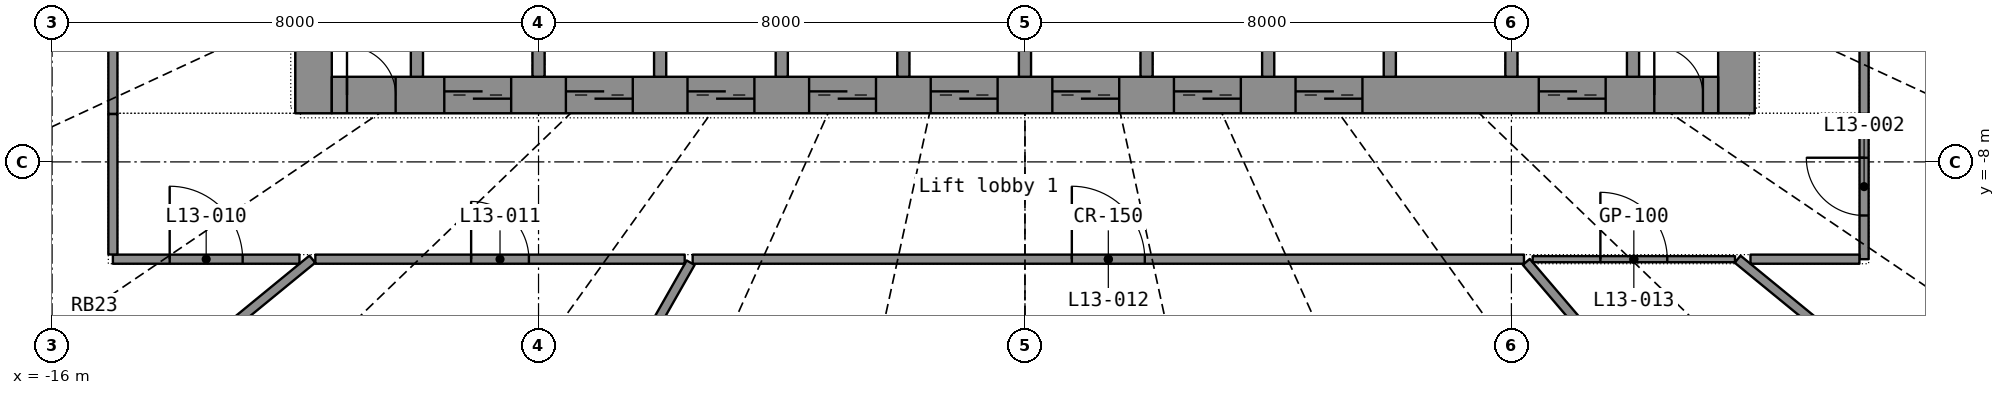
"""IFC4 building model, lengths in metres.
Left out: names, types, materials, properties, quantities, classifications, styles, units other than length and angle.
Written with IfcOpenShell. Run it as: python <this file> out.ifc"""

import sys

from ifc_helpers import new_model, si_unit, direction, frame, frame_2d, origin, place, context, subcontext, project, spatial, rectangle, extrude, element, fill, save


model = new_model("IFC4")
c1 = context("Model", 3, precision=1e-05, world=origin(), true_north=direction((0.0, 1.0)))
c2 = subcontext(c1, "Body", "Model", "MODEL_VIEW")
j1 = project(units=[si_unit("LENGTHUNIT", "METRE"), si_unit("PLANEANGLEUNIT", "RADIAN")], contexts=[c1])
p1 = place(None, origin())
s1 = spatial("IfcSite", under=j1, at=p1, CompositionType="ELEMENT")
p2 = place(p1, origin())
s2 = spatial("IfcBuilding", under=s1, at=p2, CompositionType="ELEMENT")
p3 = place(p2, frame((0.0, 0.0, 59.3)))
s3 = spatial("IfcBuildingStorey", under=s2, at=p3, CompositionType="ELEMENT", Elevation=59.3)
p4 = place(p3, frame((-11.7, -7.2, 0.0), z_axis=(0.0, 0.0, 1.0), x_axis=(0.0, 1.0, 0.0)))
e1 = element("IfcWall", 1, at=p4, inside=s3, PredefinedType="SHEAR", context=c2, shape_type="SweptSolid", body=[
    extrude(rectangle(XDim=14.4, YDim=0.6, at=frame_2d((7.2, 0.0))), origin(), (0.0, 0.0, 1.0), 3.3),
])
p5 = place(p4, frame((6.5, 0.0, 0.0)))
e2 = element("IfcOpeningElement", 2, at=p5, cuts=e1, PredefinedType="OPENING", context=c2, shape_type="SweptSolid", body=[
    extrude(rectangle(XDim=1.4, YDim=2.2, at=frame_2d((0.7, 1.1))), frame((0.0, 0.31, 0.0), z_axis=(0.0, -1.0, 0.0), x_axis=(1.0, 0.0, 0.0)), (0.0, 0.0, 1.0), 0.62),
])
p6 = place(p3, frame((11.7, -7.2, 0.0), z_axis=(0.0, 0.0, 1.0), x_axis=(0.0, 1.0, 0.0)))
e3 = element("IfcWall", 3, at=p6, inside=s3, PredefinedType="SHEAR", context=c2, shape_type="SweptSolid", body=[
    extrude(rectangle(XDim=14.4, YDim=0.6, at=frame_2d((7.2, 0.0))), origin(), (0.0, 0.0, 1.0), 3.3),
])
p7 = place(p6, frame((6.5, 0.0, 0.0)))
e4 = element("IfcOpeningElement", 4, at=p7, cuts=e3, PredefinedType="OPENING", context=c2, shape_type="SweptSolid", body=[
    extrude(rectangle(XDim=1.4, YDim=2.2, at=frame_2d((0.7, 1.1))), frame((0.0, 0.31, 0.0), z_axis=(0.0, -1.0, 0.0), x_axis=(1.0, 0.0, 0.0)), (0.0, 0.0, 1.0), 0.62),
])
p8 = place(p3, frame((-11.4, -6.9, 0.0), z_axis=(0.0, 0.0, 1.0), x_axis=(1.0, 0.0, 0.0)))
e5 = element("IfcWall", 5, at=p8, inside=s3, PredefinedType="SHEAR", context=c2, shape_type="SweptSolid", body=[
    extrude(rectangle(XDim=22.8, YDim=0.6, at=frame_2d((11.4, 0.0))), origin(), (0.0, 0.0, 1.0), 3.3),
])
p9 = place(p8, frame((1.85, 0.0, 0.0)))
e6 = element("IfcOpeningElement", 6, at=p9, cuts=e5, PredefinedType="OPENING", context=c2, shape_type="SweptSolid", body=[
    extrude(rectangle(XDim=1.1, YDim=2.2, at=frame_2d((0.55, 1.1))), frame((0.0, 0.31, 0.0), z_axis=(0.0, -1.0, 0.0), x_axis=(1.0, 0.0, 0.0)), (0.0, 0.0, 1.0), 0.62),
])
p10 = place(p8, frame((3.85, 0.0, 0.0)))
e7 = element("IfcOpeningElement", 7, at=p10, cuts=e5, PredefinedType="OPENING", context=c2, shape_type="SweptSolid", body=[
    extrude(rectangle(XDim=1.1, YDim=2.2, at=frame_2d((0.55, 1.1))), frame((0.0, 0.31, 0.0), z_axis=(0.0, -1.0, 0.0), x_axis=(1.0, 0.0, 0.0)), (0.0, 0.0, 1.0), 0.62),
])
p11 = place(p8, frame((5.85, 0.0, 0.0)))
e8 = element("IfcOpeningElement", 8, at=p11, cuts=e5, PredefinedType="OPENING", context=c2, shape_type="SweptSolid", body=[
    extrude(rectangle(XDim=1.1, YDim=2.2, at=frame_2d((0.55, 1.1))), frame((0.0, 0.31, 0.0), z_axis=(0.0, -1.0, 0.0), x_axis=(1.0, 0.0, 0.0)), (0.0, 0.0, 1.0), 0.62),
])
p12 = place(p8, frame((7.85, 0.0, 0.0)))
e9 = element("IfcOpeningElement", 9, at=p12, cuts=e5, PredefinedType="OPENING", context=c2, shape_type="SweptSolid", body=[
    extrude(rectangle(XDim=1.1, YDim=2.2, at=frame_2d((0.55, 1.1))), frame((0.0, 0.31, 0.0), z_axis=(0.0, -1.0, 0.0), x_axis=(1.0, 0.0, 0.0)), (0.0, 0.0, 1.0), 0.62),
])
p13 = place(p8, frame((9.85, 0.0, 0.0)))
e10 = element("IfcOpeningElement", 10, at=p13, cuts=e5, PredefinedType="OPENING", context=c2, shape_type="SweptSolid", body=[
    extrude(rectangle(XDim=1.1, YDim=2.2, at=frame_2d((0.55, 1.1))), frame((0.0, 0.31, 0.0), z_axis=(0.0, -1.0, 0.0), x_axis=(1.0, 0.0, 0.0)), (0.0, 0.0, 1.0), 0.62),
])
p14 = place(p8, frame((11.85, 0.0, 0.0)))
e11 = element("IfcOpeningElement", 11, at=p14, cuts=e5, PredefinedType="OPENING", context=c2, shape_type="SweptSolid", body=[
    extrude(rectangle(XDim=1.1, YDim=2.2, at=frame_2d((0.55, 1.1))), frame((0.0, 0.31, 0.0), z_axis=(0.0, -1.0, 0.0), x_axis=(1.0, 0.0, 0.0)), (0.0, 0.0, 1.0), 0.62),
])
p15 = place(p8, frame((13.85, 0.0, 0.0)))
e12 = element("IfcOpeningElement", 12, at=p15, cuts=e5, PredefinedType="OPENING", context=c2, shape_type="SweptSolid", body=[
    extrude(rectangle(XDim=1.1, YDim=2.2, at=frame_2d((0.55, 1.1))), frame((0.0, 0.31, 0.0), z_axis=(0.0, -1.0, 0.0), x_axis=(1.0, 0.0, 0.0)), (0.0, 0.0, 1.0), 0.62),
])
p16 = place(p8, frame((15.85, 0.0, 0.0)))
e13 = element("IfcOpeningElement", 13, at=p16, cuts=e5, PredefinedType="OPENING", context=c2, shape_type="SweptSolid", body=[
    extrude(rectangle(XDim=1.1, YDim=2.2, at=frame_2d((0.55, 1.1))), frame((0.0, 0.31, 0.0), z_axis=(0.0, -1.0, 0.0), x_axis=(1.0, 0.0, 0.0)), (0.0, 0.0, 1.0), 0.62),
])
p17 = place(p8, frame((19.85, 0.0, 0.0)))
e14 = element("IfcOpeningElement", 14, at=p17, cuts=e5, PredefinedType="OPENING", context=c2, shape_type="SweptSolid", body=[
    extrude(rectangle(XDim=1.1, YDim=2.2, at=frame_2d((0.55, 1.1))), frame((0.0, 0.31, 0.0), z_axis=(0.0, -1.0, 0.0), x_axis=(1.0, 0.0, 0.0)), (0.0, 0.0, 1.0), 0.62),
])
p18 = place(p8, frame((0.25, 0.0, 0.0)))
e15 = element("IfcOpeningElement", 15, at=p18, cuts=e5, PredefinedType="OPENING", context=c2, shape_type="SweptSolid", body=[
    extrude(rectangle(XDim=0.8, YDim=2.05, at=frame_2d((0.4, 1.025))), frame((0.0, 0.31, 0.0), z_axis=(0.0, -1.0, 0.0), x_axis=(1.0, 0.0, 0.0)), (0.0, 0.0, 1.0), 0.62),
])
p19 = place(p8, frame((21.75, 0.0, 0.0)))
e16 = element("IfcOpeningElement", 16, at=p19, cuts=e5, PredefinedType="OPENING", context=c2, shape_type="SweptSolid", body=[
    extrude(rectangle(XDim=0.8, YDim=2.05, at=frame_2d((0.4, 1.025))), frame((0.0, 0.31, 0.0), z_axis=(0.0, -1.0, 0.0), x_axis=(1.0, 0.0, 0.0)), (0.0, 0.0, 1.0), 0.62),
])
for number, where, z_axis, x_axis in (
    (17, (-10.0, -6.6, 0.0), (0.0, 0.0, 1.0), (0.0, 1.0, 0.0)),
    (18, (-8.0, -6.6, 0.0), (0.0, 0.0, 1.0), (0.0, 1.0, 0.0)),
    (19, (-6.0, -6.6, 0.0), (0.0, 0.0, 1.0), (0.0, 1.0, 0.0)),
    (20, (-4.0, -6.6, 0.0), (0.0, 0.0, 1.0), (0.0, 1.0, 0.0)),
    (21, (-2.0, -6.6, 0.0), (0.0, 0.0, 1.0), (0.0, 1.0, 0.0)),
    (22, (0.0, -6.6, 0.0), (0.0, 0.0, 1.0), (0.0, 1.0, 0.0)),
    (23, (2.0, -6.6, 0.0), (0.0, 0.0, 1.0), (0.0, 1.0, 0.0)),
    (24, (4.0, -6.6, 0.0), (0.0, 0.0, 1.0), (0.0, 1.0, 0.0)),
    (25, (6.0, -6.6, 0.0), (0.0, 0.0, 1.0), (0.0, 1.0, 0.0)),
    (26, (8.0, -6.6, 0.0), (0.0, 0.0, 1.0), (0.0, 1.0, 0.0)),
    (27, (10.0, -6.6, 0.0), (0.0, 0.0, 1.0), (0.0, 1.0, 0.0)),
):
    element("IfcWall", number, at=place(p3, frame(where, z_axis=z_axis, x_axis=x_axis)), inside=s3, PredefinedType="SHEAR", context=c2, shape_type="SweptSolid", body=[
        extrude(rectangle(XDim=2.7, YDim=0.2, at=frame_2d((1.35, 0.0))), origin(), (0.0, 0.0, 1.0), 3.3),
    ])
p20 = place(p3, frame((-5.465, -9.6, 0.0), z_axis=(0.0, 0.0, 1.0), x_axis=(1.0, 0.0, 0.0)))
e28 = element("IfcWall", 28, at=p20, inside=s3, PredefinedType="PARTITIONING", context=c2, shape_type="SweptSolid", body=[
    extrude(rectangle(XDim=13.672, YDim=0.15, at=frame_2d((6.836, 0.0))), origin(), (0.0, 0.0, 1.0), 2.4),
])
p21 = place(p20, frame((6.236, 0.0, 0.0)))
e29 = element("IfcOpeningElement", 29, at=p21, cuts=e28, PredefinedType="OPENING", context=c2, shape_type="SweptSolid", body=[
    extrude(rectangle(XDim=1.2, YDim=2.2, at=frame_2d((0.6, 1.1))), frame((0.0, 0.085, 0.0), z_axis=(0.0, -1.0, 0.0), x_axis=(1.0, 0.0, 0.0)), (0.0, 0.0, 1.0), 0.17),
])
p22 = place(p3, frame((-11.476, -20.159, 0.0), z_axis=(0.0, 0.0, 1.0), x_axis=(0.494734776, 0.869044016, 0.0)))
e30 = element("IfcWall", 30, at=p22, inside=s3, PredefinedType="PARTITIONING", context=c2, shape_type="SweptSolid", body=[
    extrude(rectangle(XDim=12.083, YDim=0.15, at=frame_2d((6.042, 0.0))), origin(), (0.0, 0.0, 1.0), 2.4),
])
p23 = place(p3, frame((15.577, -18.223, 0.0), z_axis=(0.0, 0.0, 1.0), x_axis=(-0.649782359, 0.76012031, 0.0)))
e31 = element("IfcWall", 31, at=p23, inside=s3, PredefinedType="PARTITIONING", context=c2, shape_type="SweptSolid", body=[
    extrude(rectangle(XDim=11.285, YDim=0.15, at=frame_2d((5.642, 0.0))), origin(), (0.0, 0.0, 1.0), 2.4),
])
p24 = place(p3, frame((-15.0, 3.217, 0.0), z_axis=(0.0, 0.0, 1.0), x_axis=(0.0, -1.0, 0.0)))
e32 = element("IfcWall", 32, at=p24, inside=s3, PredefinedType="PARTITIONING", context=c2, shape_type="SweptSolid", body=[
    extrude(rectangle(XDim=10.429, YDim=0.15, at=frame_2d((5.214, 0.0))), origin(), (0.0, 0.0, 1.0), 2.4),
])
p25 = place(p24, frame((4.615, 0.0, 0.0)))
e33 = element("IfcOpeningElement", 33, at=p25, cuts=e32, PredefinedType="OPENING", context=c2, shape_type="SweptSolid", body=[
    extrude(rectangle(XDim=1.2, YDim=2.2, at=frame_2d((0.6, 1.1))), frame((0.0, 0.085, 0.0), z_axis=(0.0, -1.0, 0.0), x_axis=(1.0, 0.0, 0.0)), (0.0, 0.0, 1.0), 0.17),
])
for number, where, z_axis, x_axis in (
    (34, (-19.207, -15.733, 0.0), (0.0, 0.0, 1.0), (0.774, 0.634, 0.0)),
    (35, (11.72, -9.6, 0.0), (0.0, 0.0, 1.0), (0.774, -0.634, 0.0)),
):
    element("IfcWall", number, at=place(p3, frame(where, z_axis=z_axis, x_axis=x_axis)), inside=s3, PredefinedType="PARTITIONING", context=c2, shape_type="SweptSolid", body=[
        extrude(rectangle(XDim=9.678, YDim=0.15, at=frame_2d((4.839, 0.0))), origin(), (0.0, 0.0, 1.0), 2.4),
    ])
p26 = place(p3, frame((-11.671, -9.6, 0.0), z_axis=(0.0, 0.0, 1.0), x_axis=(1.0, 0.0, 0.0)))
e36 = element("IfcWall", 36, at=p26, inside=s3, PredefinedType="PARTITIONING", context=c2, shape_type="SweptSolid", body=[
    extrude(rectangle(XDim=6.074, YDim=0.15, at=frame_2d((3.037, 0.0))), origin(), (0.0, 0.0, 1.0), 2.4),
])
p27 = place(p26, frame((2.562, 0.0, 0.0)))
e37 = element("IfcOpeningElement", 37, at=p27, cuts=e36, PredefinedType="OPENING", context=c2, shape_type="SweptSolid", body=[
    extrude(rectangle(XDim=0.95, YDim=2.15, at=frame_2d((0.475, 1.075))), frame((0.0, 0.085, 0.0), z_axis=(0.0, -1.0, 0.0), x_axis=(1.0, 0.0, 0.0)), (0.0, 0.0, 1.0), 0.17),
])
p28 = place(p3, frame((13.8, -7.212, 0.0), z_axis=(0.0, 0.0, 1.0), x_axis=(0.0, 1.0, 0.0)))
e38 = element("IfcWall", 38, at=p28, inside=s3, PredefinedType="PARTITIONING", context=c2, shape_type="SweptSolid", body=[
    extrude(rectangle(XDim=4.088, YDim=0.15, at=frame_2d((2.044, 0.0))), origin(), (0.0, 0.0, 1.0), 2.4),
])
p29 = place(p28, frame((1.569, 0.0, 0.0)))
e39 = element("IfcOpeningElement", 39, at=p29, cuts=e38, PredefinedType="OPENING", context=c2, shape_type="SweptSolid", body=[
    extrude(rectangle(XDim=0.95, YDim=2.15, at=frame_2d((0.475, 1.075))), frame((0.0, 0.085, 0.0), z_axis=(0.0, -1.0, 0.0), x_axis=(1.0, 0.0, 0.0)), (0.0, 0.0, 1.0), 0.17),
])
p30 = place(p3, frame((8.35, -9.6, 0.0), z_axis=(0.0, 0.0, 1.0), x_axis=(1.0, 0.0, 0.0)))
e40 = element("IfcWall", 40, at=p30, inside=s3, PredefinedType="PARTITIONING", context=c2, shape_type="SweptSolid", body=[
    extrude(rectangle(XDim=3.327, YDim=0.1, at=frame_2d((1.664, 0.0))), origin(), (0.0, 0.0, 1.0), 2.4),
])
p31 = place(p30, frame((1.114, 0.0, 0.0)))
e41 = element("IfcOpeningElement", 41, at=p31, cuts=e40, PredefinedType="OPENING", context=c2, shape_type="SweptSolid", body=[
    extrude(rectangle(XDim=1.1, YDim=2.2, at=frame_2d((0.55, 1.1))), frame((0.0, 0.06, 0.0), z_axis=(0.0, -1.0, 0.0), x_axis=(1.0, 0.0, 0.0)), (0.0, 0.0, 1.0), 0.12),
])
p32 = place(p3, frame((-15.0, -9.6, 0.0), z_axis=(0.0, 0.0, 1.0), x_axis=(1.0, 0.0, 0.0)))
e42 = element("IfcWall", 42, at=p32, inside=s3, PredefinedType="PARTITIONING", context=c2, shape_type="SweptSolid", body=[
    extrude(rectangle(XDim=3.068, YDim=0.15, at=frame_2d((1.534, 0.0))), origin(), (0.0, 0.0, 1.0), 2.4),
])
p33 = place(p32, frame((0.934, 0.0, 0.0)))
e43 = element("IfcOpeningElement", 43, at=p33, cuts=e42, PredefinedType="OPENING", context=c2, shape_type="SweptSolid", body=[
    extrude(rectangle(XDim=1.2, YDim=2.2, at=frame_2d((0.6, 1.1))), frame((0.0, 0.085, 0.0), z_axis=(0.0, -1.0, 0.0), x_axis=(1.0, 0.0, 0.0)), (0.0, 0.0, 1.0), 0.17),
])
p34 = place(p3, frame((-15.0, -7.213, 0.0), z_axis=(0.0, 0.0, 1.0), x_axis=(0.0, -1.0, 0.0)))
e44 = element("IfcWall", 44, at=p34, inside=s3, PredefinedType="PARTITIONING", context=c2, shape_type="SweptSolid", body=[
    extrude(rectangle(XDim=2.31, YDim=0.15, at=frame_2d((1.155, 0.0))), origin(), (0.0, 0.0, 1.0), 2.4),
])
p35 = place(p3, frame((13.8, -9.6, 0.0), z_axis=(0.0, 0.0, 1.0), x_axis=(0.0, 1.0, 0.0)))
e45 = element("IfcWall", 45, at=p35, inside=s3, PredefinedType="PARTITIONING", context=c2, shape_type="SweptSolid", body=[
    extrude(rectangle(XDim=2.387, YDim=0.15, at=frame_2d((1.194, 0.0))), origin(), (0.0, 0.0, 1.0), 2.4),
])
p36 = place(p35, frame((0.719, 0.0, 0.0)))
e46 = element("IfcOpeningElement", 46, at=p36, cuts=e45, PredefinedType="OPENING", context=c2, shape_type="SweptSolid", body=[
    extrude(rectangle(XDim=0.95, YDim=2.15, at=frame_2d((0.475, 1.075))), frame((0.0, 0.085, 0.0), z_axis=(0.0, -1.0, 0.0), x_axis=(1.0, 0.0, 0.0)), (0.0, 0.0, 1.0), 0.17),
])
p37 = place(p3, frame((11.932, -9.6, 0.0), z_axis=(0.0, 0.0, 1.0), x_axis=(1.0, 0.0, 0.0)))
e47 = element("IfcWall", 47, at=p37, inside=s3, PredefinedType="PARTITIONING", context=c2, shape_type="SweptSolid", body=[
    extrude(rectangle(XDim=1.791, YDim=0.15, at=frame_2d((0.896, 0.0))), origin(), (0.0, 0.0, 1.0), 2.4),
])
p38 = place(p9, origin())
e48 = element("IfcDoor", 48, at=p38, inside=s3, OperationType="DOUBLE_DOOR_SLIDING", PredefinedType="DOOR", context=c2, shape_type="SweptSolid", body=[
    extrude(rectangle(XDim=1.1, YDim=2.2, at=frame_2d((0.55, 1.1))), frame((0.0, 0.025, 0.0), z_axis=(0.0, -1.0, 0.0), x_axis=(1.0, 0.0, 0.0)), (0.0, 0.0, 1.0), 0.05),
])
fill(e6, e48)
p39 = place(p10, origin())
e49 = element("IfcDoor", 49, at=p39, inside=s3, OperationType="DOUBLE_DOOR_SLIDING", PredefinedType="DOOR", context=c2, shape_type="SweptSolid", body=[
    extrude(rectangle(XDim=1.1, YDim=2.2, at=frame_2d((0.55, 1.1))), frame((0.0, 0.025, 0.0), z_axis=(0.0, -1.0, 0.0), x_axis=(1.0, 0.0, 0.0)), (0.0, 0.0, 1.0), 0.05),
])
fill(e7, e49)
p40 = place(p11, origin())
e50 = element("IfcDoor", 50, at=p40, inside=s3, OperationType="DOUBLE_DOOR_SLIDING", PredefinedType="DOOR", context=c2, shape_type="SweptSolid", body=[
    extrude(rectangle(XDim=1.1, YDim=2.2, at=frame_2d((0.55, 1.1))), frame((0.0, 0.025, 0.0), z_axis=(0.0, -1.0, 0.0), x_axis=(1.0, 0.0, 0.0)), (0.0, 0.0, 1.0), 0.05),
])
fill(e8, e50)
p41 = place(p12, origin())
e51 = element("IfcDoor", 51, at=p41, inside=s3, OperationType="DOUBLE_DOOR_SLIDING", PredefinedType="DOOR", context=c2, shape_type="SweptSolid", body=[
    extrude(rectangle(XDim=1.1, YDim=2.2, at=frame_2d((0.55, 1.1))), frame((0.0, 0.025, 0.0), z_axis=(0.0, -1.0, 0.0), x_axis=(1.0, 0.0, 0.0)), (0.0, 0.0, 1.0), 0.05),
])
fill(e9, e51)
p42 = place(p13, origin())
e52 = element("IfcDoor", 52, at=p42, inside=s3, OperationType="DOUBLE_DOOR_SLIDING", PredefinedType="DOOR", context=c2, shape_type="SweptSolid", body=[
    extrude(rectangle(XDim=1.1, YDim=2.2, at=frame_2d((0.55, 1.1))), frame((0.0, 0.025, 0.0), z_axis=(0.0, -1.0, 0.0), x_axis=(1.0, 0.0, 0.0)), (0.0, 0.0, 1.0), 0.05),
])
fill(e10, e52)
p43 = place(p14, origin())
e53 = element("IfcDoor", 53, at=p43, inside=s3, OperationType="DOUBLE_DOOR_SLIDING", PredefinedType="DOOR", context=c2, shape_type="SweptSolid", body=[
    extrude(rectangle(XDim=1.1, YDim=2.2, at=frame_2d((0.55, 1.1))), frame((0.0, 0.025, 0.0), z_axis=(0.0, -1.0, 0.0), x_axis=(1.0, 0.0, 0.0)), (0.0, 0.0, 1.0), 0.05),
])
fill(e11, e53)
p44 = place(p15, origin())
e54 = element("IfcDoor", 54, at=p44, inside=s3, OperationType="DOUBLE_DOOR_SLIDING", PredefinedType="DOOR", context=c2, shape_type="SweptSolid", body=[
    extrude(rectangle(XDim=1.1, YDim=2.2, at=frame_2d((0.55, 1.1))), frame((0.0, 0.025, 0.0), z_axis=(0.0, -1.0, 0.0), x_axis=(1.0, 0.0, 0.0)), (0.0, 0.0, 1.0), 0.05),
])
fill(e12, e54)
p45 = place(p16, origin())
e55 = element("IfcDoor", 55, at=p45, inside=s3, OperationType="DOUBLE_DOOR_SLIDING", PredefinedType="DOOR", context=c2, shape_type="SweptSolid", body=[
    extrude(rectangle(XDim=1.1, YDim=2.2, at=frame_2d((0.55, 1.1))), frame((0.0, 0.025, 0.0), z_axis=(0.0, -1.0, 0.0), x_axis=(1.0, 0.0, 0.0)), (0.0, 0.0, 1.0), 0.05),
])
fill(e13, e55)
p46 = place(p17, origin())
e56 = element("IfcDoor", 56, at=p46, inside=s3, OperationType="DOUBLE_DOOR_SLIDING", PredefinedType="DOOR", context=c2, shape_type="SweptSolid", body=[
    extrude(rectangle(XDim=1.1, YDim=2.2, at=frame_2d((0.55, 1.1))), frame((0.0, 0.025, 0.0), z_axis=(0.0, -1.0, 0.0), x_axis=(1.0, 0.0, 0.0)), (0.0, 0.0, 1.0), 0.05),
])
fill(e14, e56)
p47 = place(p18, origin())
e57 = element("IfcDoor", 57, at=p47, inside=s3, OperationType="SINGLE_SWING_LEFT", PredefinedType="DOOR", context=c2, shape_type="SweptSolid", body=[
    extrude(rectangle(XDim=0.8, YDim=2.05, at=frame_2d((0.4, 1.025))), frame((0.0, 0.025, 0.0), z_axis=(0.0, -1.0, 0.0), x_axis=(1.0, 0.0, 0.0)), (0.0, 0.0, 1.0), 0.05),
])
fill(e15, e57)
p48 = place(p19, origin())
e58 = element("IfcDoor", 58, at=p48, inside=s3, OperationType="SINGLE_SWING_LEFT", PredefinedType="DOOR", context=c2, shape_type="SweptSolid", body=[
    extrude(rectangle(XDim=0.8, YDim=2.05, at=frame_2d((0.4, 1.025))), frame((0.0, 0.025, 0.0), z_axis=(0.0, -1.0, 0.0), x_axis=(1.0, 0.0, 0.0)), (0.0, 0.0, 1.0), 0.05),
])
fill(e16, e58)
p49 = place(p36, origin())
e59 = element("IfcDoor", 59, at=p49, inside=s3, OperationType="SINGLE_SWING_RIGHT", PredefinedType="DOOR", context=c2, shape_type="SweptSolid", body=[
    extrude(rectangle(XDim=0.95, YDim=2.15, at=frame_2d((0.475, 1.075))), frame((0.0, 0.025, 0.0), z_axis=(0.0, -1.0, 0.0), x_axis=(1.0, 0.0, 0.0)), (0.0, 0.0, 1.0), 0.05),
])
fill(e46, e59)
p50 = place(p33, origin())
e60 = element("IfcDoor", 60, at=p50, inside=s3, OperationType="DOUBLE_DOOR_SINGLE_SWING", PredefinedType="DOOR", context=c2, shape_type="SweptSolid", body=[
    extrude(rectangle(XDim=1.2, YDim=2.2, at=frame_2d((0.6, 1.1))), frame((0.0, 0.025, 0.0), z_axis=(0.0, -1.0, 0.0), x_axis=(1.0, 0.0, 0.0)), (0.0, 0.0, 1.0), 0.05),
])
fill(e43, e60)
p51 = place(p27, origin())
e61 = element("IfcDoor", 61, at=p51, inside=s3, OperationType="SINGLE_SWING_LEFT", PredefinedType="DOOR", context=c2, shape_type="SweptSolid", body=[
    extrude(rectangle(XDim=0.95, YDim=2.15, at=frame_2d((0.475, 1.075))), frame((0.0, 0.025, 0.0), z_axis=(0.0, -1.0, 0.0), x_axis=(1.0, 0.0, 0.0)), (0.0, 0.0, 1.0), 0.05),
])
fill(e37, e61)
p52 = place(p21, origin())
e62 = element("IfcDoor", 62, at=p52, inside=s3, OperationType="DOUBLE_DOOR_SINGLE_SWING", PredefinedType="DOOR", context=c2, shape_type="SweptSolid", body=[
    extrude(rectangle(XDim=1.2, YDim=2.2, at=frame_2d((0.6, 1.1))), frame((0.0, 0.025, 0.0), z_axis=(0.0, -1.0, 0.0), x_axis=(1.0, 0.0, 0.0)), (0.0, 0.0, 1.0), 0.05),
])
fill(e29, e62)
p53 = place(p31, origin())
e63 = element("IfcDoor", 63, at=p53, inside=s3, OperationType="SINGLE_SWING_LEFT", PredefinedType="DOOR", context=c2, shape_type="SweptSolid", body=[
    extrude(rectangle(XDim=1.1, YDim=2.2, at=frame_2d((0.55, 1.1))), frame((0.0, 0.025, 0.0), z_axis=(0.0, -1.0, 0.0), x_axis=(1.0, 0.0, 0.0)), (0.0, 0.0, 1.0), 0.05),
])
fill(e41, e63)
save(model, sys.argv[1])
